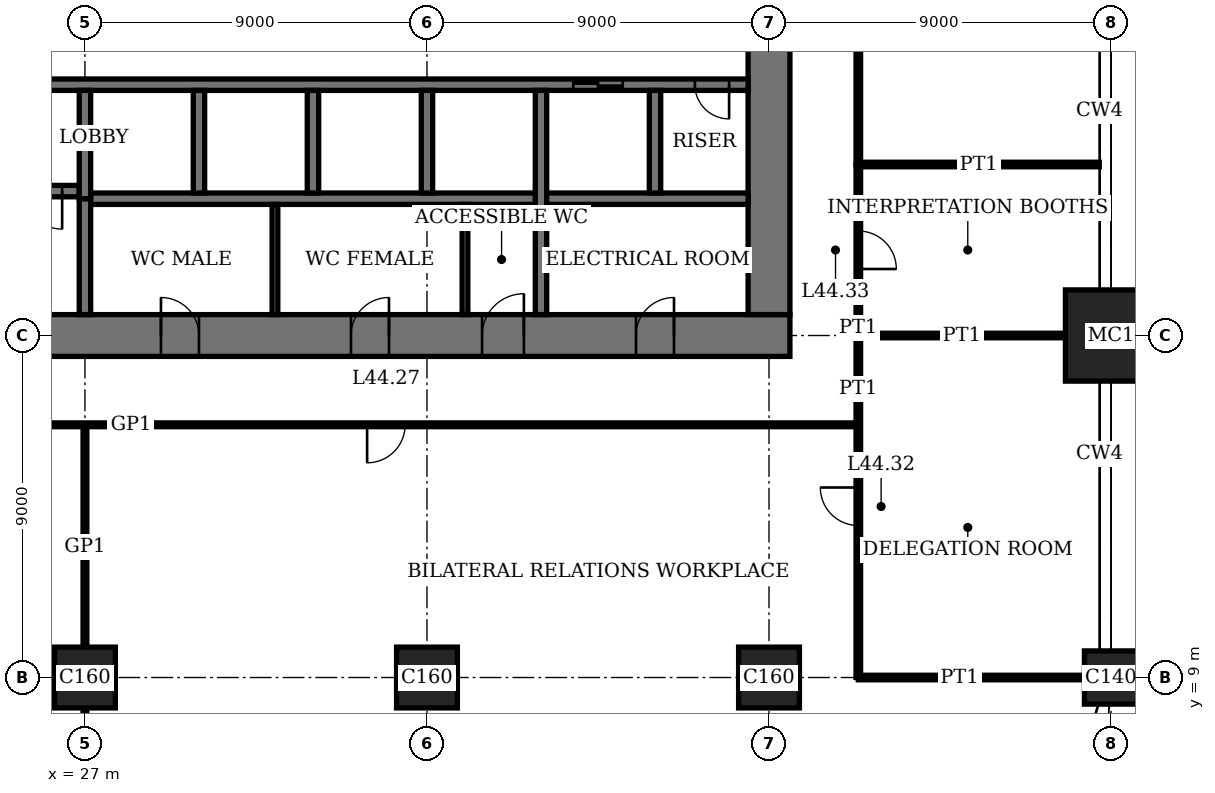
"""IFC4 building model, lengths in metres.
Left out: names, types, materials, properties, quantities, classifications, styles, units other than length and angle.
Written with IfcOpenShell. Run it as: python <this file> out.ifc"""

import sys

from ifc_helpers import new_model, si_unit, direction, frame, frame_2d, origin, origin_2d, place, context, subcontext, project, spatial, rectangle, extrude, element, fill, save


model = new_model("IFC4")
c1 = context("Model", 3, precision=1e-05, world=origin(), true_north=direction((0.0, 1.0)))
c2 = subcontext(c1, "Body", "Model", "MODEL_VIEW")
j1 = project(units=[si_unit("LENGTHUNIT", "METRE"), si_unit("PLANEANGLEUNIT", "RADIAN")], contexts=[c1])
p1 = place(None, origin())
s1 = spatial("IfcSite", under=j1, at=p1, CompositionType="ELEMENT")
p2 = place(p1, origin())
s2 = spatial("IfcBuilding", under=s1, at=p2, CompositionType="ELEMENT")
p3 = place(p2, frame((0.0, 0.0, 182.2)))
s3 = spatial("IfcBuildingStorey", under=s2, at=p3, CompositionType="ELEMENT", Elevation=182.2)
for number, where, z_axis, x_axis in (
    (1, (27.0, 9.0, 0.0), (0.0, 0.0, 1.0), (1.0, 0.0, 0.0)),
    (2, (36.0, 9.0, 0.0), (0.0, 0.0, 1.0), (1.0, 0.0, 0.0)),
    (3, (45.0, 9.0, 0.0), (0.0, 0.0, 1.0), (1.0, 0.0, 0.0)),
):
    element("IfcColumn", number, at=place(p3, frame(where, z_axis=z_axis, x_axis=x_axis)), inside=s3, PredefinedType="COLUMN", context=c2, shape_type="SweptSolid", body=[
        extrude(rectangle(XDim=1.6, YDim=1.6, at=origin_2d()), origin(), (0.0, 0.0, 1.0), 4.0),
    ])
p4 = place(p3, frame((54.0, 9.0, 0.0), z_axis=(0.0, 0.0, 1.0), x_axis=(1.0, 0.0, 0.0)))
e4 = element("IfcColumn", 4, at=p4, inside=s3, PredefinedType="COLUMN", context=c2, shape_type="SweptSolid", body=[
    extrude(rectangle(XDim=1.4, YDim=1.4, at=origin_2d()), origin(), (0.0, 0.0, 1.0), 4.0),
])
p5 = place(p3, frame((54.0, 18.0, 0.0), z_axis=(0.0, 0.0, 1.0), x_axis=(1.0, 0.0, 0.0)))
e5 = element("IfcColumn", 5, at=p5, inside=s3, PredefinedType="COLUMN", context=c2, shape_type="SweptSolid", body=[
    extrude(rectangle(XDim=2.4, YDim=2.4, at=origin_2d()), origin(), (0.0, 0.0, 1.0), 4.0),
])
p6 = place(p3, frame((17.45, 18.0, 0.0), z_axis=(0.0, 0.0, 1.0), x_axis=(1.0, 0.0, 0.0)))
e6 = element("IfcWall", 6, at=p6, inside=s3, PredefinedType="SHEAR", context=c2, shape_type="SweptSolid", body=[
    extrude(rectangle(XDim=28.1, YDim=1.1, at=frame_2d((14.05, 0.0))), origin(), (0.0, 0.0, 1.0), 4.0),
])
p7 = place(p6, frame((11.55, 0.0, 0.0)))
e7 = element("IfcOpeningElement", 7, at=p7, cuts=e6, PredefinedType="OPENING", context=c2, shape_type="SweptSolid", body=[
    extrude(rectangle(XDim=1.0, YDim=2.4, at=frame_2d((0.5, 1.2))), frame((0.0, 0.56, 0.0), z_axis=(0.0, -1.0, 0.0), x_axis=(1.0, 0.0, 0.0)), (0.0, 0.0, 1.0), 1.12),
])
p8 = place(p6, frame((16.55, 0.0, 0.0)))
e8 = element("IfcOpeningElement", 8, at=p8, cuts=e6, PredefinedType="OPENING", context=c2, shape_type="SweptSolid", body=[
    extrude(rectangle(XDim=1.0, YDim=2.4, at=frame_2d((0.5, 1.2))), frame((0.0, 0.56, 0.0), z_axis=(0.0, -1.0, 0.0), x_axis=(1.0, 0.0, 0.0)), (0.0, 0.0, 1.0), 1.12),
])
p9 = place(p6, frame((20.0, 0.0, 0.0)))
e9 = element("IfcOpeningElement", 9, at=p9, cuts=e6, PredefinedType="OPENING", context=c2, shape_type="SweptSolid", body=[
    extrude(rectangle(XDim=1.1, YDim=2.4, at=frame_2d((0.55, 1.2))), frame((0.0, 0.56, 0.0), z_axis=(0.0, -1.0, 0.0), x_axis=(1.0, 0.0, 0.0)), (0.0, 0.0, 1.0), 1.12),
])
p10 = place(p6, frame((24.05, 0.0, 0.0)))
e10 = element("IfcOpeningElement", 10, at=p10, cuts=e6, PredefinedType="OPENING", context=c2, shape_type="SweptSolid", body=[
    extrude(rectangle(XDim=1.0, YDim=2.4, at=frame_2d((0.5, 1.2))), frame((0.0, 0.56, 0.0), z_axis=(0.0, -1.0, 0.0), x_axis=(1.0, 0.0, 0.0)), (0.0, 0.0, 1.0), 1.12),
])
p11 = place(p3, frame((45.0, 18.55, 0.0), z_axis=(0.0, 0.0, 1.0), x_axis=(0.0, 1.0, 0.0)))
e11 = element("IfcWall", 11, at=p11, inside=s3, PredefinedType="SHEAR", context=c2, shape_type="SweptSolid", body=[
    extrude(rectangle(XDim=16.9, YDim=1.1, at=frame_2d((8.45, 0.0))), origin(), (0.0, 0.0, 1.0), 4.0),
])
p12 = place(p11, frame((8.45, 0.0, 0.0)))
e12 = element("IfcOpeningElement", 12, at=p12, cuts=e11, PredefinedType="OPENING", context=c2, shape_type="SweptSolid", body=[
    extrude(rectangle(XDim=1.8, YDim=2.4, at=frame_2d((0.9, 1.2))), frame((0.0, 0.56, 0.0), z_axis=(0.0, -1.0, 0.0), x_axis=(1.0, 0.0, 0.0)), (0.0, 0.0, 1.0), 1.12),
])
p13 = place(p3, frame((18.55, 21.8, 0.0), z_axis=(0.0, 0.0, 1.0), x_axis=(1.0, 0.0, 0.0)))
e13 = element("IfcWall", 13, at=p13, inside=s3, PredefinedType="SHEAR", context=c2, shape_type="SweptSolid", body=[
    extrude(rectangle(XDim=8.3, YDim=0.3, at=frame_2d((4.15, 0.0))), origin(), (0.0, 0.0, 1.0), 4.0),
])
p14 = place(p13, frame((6.85, 0.0, 0.0)))
e14 = element("IfcOpeningElement", 14, at=p14, cuts=e13, PredefinedType="OPENING", context=c2, shape_type="SweptSolid", body=[
    extrude(rectangle(XDim=1.0, YDim=2.4, at=frame_2d((0.5, 1.2))), frame((0.0, 0.16, 0.0), z_axis=(0.0, -1.0, 0.0), x_axis=(1.0, 0.0, 0.0)), (0.0, 0.0, 1.0), 0.32),
])
p15 = place(p3, frame((27.0, 18.55, 0.0), z_axis=(0.0, 0.0, 1.0), x_axis=(0.0, 1.0, 0.0)))
e15 = element("IfcWall", 15, at=p15, inside=s3, PredefinedType="SHEAR", context=c2, shape_type="SweptSolid", body=[
    extrude(rectangle(XDim=3.05, YDim=0.3, at=frame_2d((1.525, 0.0))), origin(), (0.0, 0.0, 1.0), 4.0),
])
p16 = place(p3, frame((18.55, 24.6, 0.0), z_axis=(0.0, 0.0, 1.0), x_axis=(1.0, 0.0, 0.0)))
e16 = element("IfcWall", 16, at=p16, inside=s3, PredefinedType="SHEAR", context=c2, shape_type="SweptSolid", body=[
    extrude(rectangle(XDim=25.9, YDim=0.3, at=frame_2d((12.95, 0.0))), origin(), (0.0, 0.0, 1.0), 4.0),
])
p17 = place(p16, frame((4.95, 0.0, 0.0)))
e17 = element("IfcOpeningElement", 17, at=p17, cuts=e16, PredefinedType="OPENING", context=c2, shape_type="SweptSolid", body=[
    extrude(rectangle(XDim=1.0, YDim=2.4, at=frame_2d((0.5, 1.2))), frame((0.0, 0.16, 0.0), z_axis=(0.0, -1.0, 0.0), x_axis=(1.0, 0.0, 0.0)), (0.0, 0.0, 1.0), 0.32),
])
p18 = place(p16, frame((24.5, 0.0, 0.0)))
e18 = element("IfcOpeningElement", 18, at=p18, cuts=e16, PredefinedType="OPENING", context=c2, shape_type="SweptSolid", body=[
    extrude(rectangle(XDim=0.9, YDim=2.1, at=frame_2d((0.45, 1.05))), frame((0.0, 0.16, 0.0), z_axis=(0.0, -1.0, 0.0), x_axis=(1.0, 0.0, 0.0)), (0.0, 0.0, 1.0), 0.32),
])
p19 = place(p16, frame((21.3, 0.0, 0.0)))
e19 = element("IfcOpeningElement", 19, at=p19, cuts=e16, PredefinedType="OPENING", context=c2, shape_type="SweptSolid", body=[
    extrude(rectangle(XDim=1.3, YDim=2.4, at=frame_2d((0.65, 1.2))), frame((0.0, 0.16, 0.0), z_axis=(0.0, -1.0, 0.0), x_axis=(1.0, 0.0, 0.0)), (0.0, 0.0, 1.0), 0.32),
])
p20 = place(p3, frame((27.15, 21.6, 0.0), z_axis=(0.0, 0.0, 1.0), x_axis=(1.0, 0.0, 0.0)))
e20 = element("IfcWall", 20, at=p20, inside=s3, PredefinedType="SHEAR", context=c2, shape_type="SweptSolid", body=[
    extrude(rectangle(XDim=17.3, YDim=0.3, at=frame_2d((8.65, 0.0))), origin(), (0.0, 0.0, 1.0), 4.0),
])
for number, where, z_axis, x_axis in (
    (21, (30.0, 21.75, 0.0), (0.0, 0.0, 1.0), (0.0, 1.0, 0.0)),
    (22, (33.0, 21.75, 0.0), (0.0, 0.0, 1.0), (0.0, 1.0, 0.0)),
    (23, (36.0, 21.75, 0.0), (0.0, 0.0, 1.0), (0.0, 1.0, 0.0)),
):
    element("IfcWall", number, at=place(p3, frame(where, z_axis=z_axis, x_axis=x_axis)), inside=s3, PredefinedType="SHEAR", context=c2, shape_type="SweptSolid", body=[
        extrude(rectangle(XDim=2.7, YDim=0.3, at=frame_2d((1.35, 0.0))), origin(), (0.0, 0.0, 1.0), 4.0),
    ])
p21 = place(p3, frame((39.0, 18.55, 0.0), z_axis=(0.0, 0.0, 1.0), x_axis=(0.0, 1.0, 0.0)))
e24 = element("IfcWall", 24, at=p21, inside=s3, PredefinedType="SHEAR", context=c2, shape_type="SweptSolid", body=[
    extrude(rectangle(XDim=5.9, YDim=0.3, at=frame_2d((2.95, 0.0))), origin(), (0.0, 0.0, 1.0), 4.0),
])
p22 = place(p3, frame((42.0, 21.75, 0.0), z_axis=(0.0, 0.0, 1.0), x_axis=(0.0, 1.0, 0.0)))
e25 = element("IfcWall", 25, at=p22, inside=s3, PredefinedType="SHEAR", context=c2, shape_type="SweptSolid", body=[
    extrude(rectangle(XDim=2.7, YDim=0.3, at=frame_2d((1.35, 0.0))), origin(), (0.0, 0.0, 1.0), 4.0),
])
p23 = place(p3, frame((27.0, 21.6, 0.0), z_axis=(0.0, 0.0, 1.0), x_axis=(0.0, 1.0, 0.0)))
e26 = element("IfcWall", 26, at=p23, inside=s3, PredefinedType="SHEAR", context=c2, shape_type="SweptSolid", body=[
    extrude(rectangle(XDim=2.85, YDim=0.3, at=frame_2d((1.425, 0.0))), origin(), (0.0, 0.0, 1.0), 4.0),
])
p24 = place(p3, frame((47.35, 9.0, 0.0), z_axis=(0.0, 0.0, 1.0), x_axis=(1.0, 0.0, 0.0)))
e27 = element("IfcWall", 27, at=p24, inside=s3, PredefinedType="PARTITIONING", context=c2, shape_type="SweptSolid", body=[
    extrude(rectangle(XDim=5.95, YDim=0.12, at=frame_2d((2.975, 0.0))), origin(), (0.0, 0.0, 1.0), 3.05),
])
p25 = place(p3, frame((22.5, 15.65, 0.0), z_axis=(0.0, 0.0, 1.0), x_axis=(1.0, 0.0, 0.0)))
e28 = element("IfcWall", 28, at=p25, inside=s3, PredefinedType="PARTITIONING", context=c2, shape_type="SweptSolid", body=[
    extrude(rectangle(XDim=24.85, YDim=0.1, at=frame_2d((12.425, 0.0))), origin(), (0.0, 0.0, 1.0), 3.75),
])
p26 = place(p25, frame((11.925, 0.0, 0.0)))
e29 = element("IfcOpeningElement", 29, at=p26, cuts=e28, PredefinedType="OPENING", context=c2, shape_type="SweptSolid", body=[
    extrude(rectangle(XDim=1.0, YDim=2.4, at=frame_2d((0.5, 1.2))), frame((0.0, 0.06, 0.0), z_axis=(0.0, -1.0, 0.0), x_axis=(1.0, 0.0, 0.0)), (0.0, 0.0, 1.0), 0.12),
])
p27 = place(p3, frame((47.35, 18.0, 0.0), z_axis=(0.0, 0.0, 1.0), x_axis=(1.0, 0.0, 0.0)))
e30 = element("IfcWall", 30, at=p27, inside=s3, PredefinedType="PARTITIONING", context=c2, shape_type="SweptSolid", body=[
    extrude(rectangle(XDim=5.45, YDim=0.12, at=frame_2d((2.725, 0.0))), origin(), (0.0, 0.0, 1.0), 3.05),
])
p28 = place(p3, frame((47.35, 22.5, 0.0), z_axis=(0.0, 0.0, 1.0), x_axis=(1.0, 0.0, 0.0)))
e31 = element("IfcWall", 31, at=p28, inside=s3, PredefinedType="PARTITIONING", context=c2, shape_type="SweptSolid", body=[
    extrude(rectangle(XDim=6.34, YDim=0.12, at=frame_2d((3.17, 0.0))), origin(), (0.0, 0.0, 1.0), 3.1),
])
p29 = place(p3, frame((27.0, 5.4, 0.0), z_axis=(0.0, 0.0, 1.0), x_axis=(0.0, 1.0, 0.0)))
e32 = element("IfcWall", 32, at=p29, inside=s3, PredefinedType="PARTITIONING", context=c2, shape_type="SweptSolid", body=[
    extrude(rectangle(XDim=2.8, YDim=0.1, at=frame_2d((1.4, 0.0))), origin(), (0.0, 0.0, 1.0), 3.05),
])
p30 = place(p3, frame((27.0, 9.8, 0.0), z_axis=(0.0, 0.0, 1.0), x_axis=(0.0, 1.0, 0.0)))
e33 = element("IfcWall", 33, at=p30, inside=s3, PredefinedType="PARTITIONING", context=c2, shape_type="SweptSolid", body=[
    extrude(rectangle(XDim=5.85, YDim=0.1, at=frame_2d((2.925, 0.0))), origin(), (0.0, 0.0, 1.0), 3.05),
])
p31 = place(p3, frame((47.35, 9.0, 0.0), z_axis=(0.0, 0.0, 1.0), x_axis=(0.0, 1.0, 0.0)))
e34 = element("IfcWall", 34, at=p31, inside=s3, PredefinedType="PARTITIONING", context=c2, shape_type="SweptSolid", body=[
    extrude(rectangle(XDim=9.0, YDim=0.12, at=frame_2d((4.5, 0.0))), origin(), (0.0, 0.0, 1.0), 3.75),
])
p32 = place(p31, frame((4.0, 0.0, 0.0)))
e35 = element("IfcOpeningElement", 35, at=p32, cuts=e34, PredefinedType="OPENING", context=c2, shape_type="SweptSolid", body=[
    extrude(rectangle(XDim=1.0, YDim=2.4, at=frame_2d((0.5, 1.2))), frame((0.0, 0.07, 0.0), z_axis=(0.0, -1.0, 0.0), x_axis=(1.0, 0.0, 0.0)), (0.0, 0.0, 1.0), 0.14),
])
p33 = place(p3, frame((47.35, 18.0, 0.0), z_axis=(0.0, 0.0, 1.0), x_axis=(0.0, 1.0, 0.0)))
e36 = element("IfcWall", 36, at=p33, inside=s3, PredefinedType="PARTITIONING", context=c2, shape_type="SweptSolid", body=[
    extrude(rectangle(XDim=4.5, YDim=0.12, at=frame_2d((2.25, 0.0))), origin(), (0.0, 0.0, 1.0), 3.75),
])
p34 = place(p33, frame((1.75, 0.0, 0.0)))
e37 = element("IfcOpeningElement", 37, at=p34, cuts=e36, PredefinedType="OPENING", context=c2, shape_type="SweptSolid", body=[
    extrude(rectangle(XDim=1.0, YDim=2.4, at=frame_2d((0.5, 1.2))), frame((0.0, 0.07, 0.0), z_axis=(0.0, -1.0, 0.0), x_axis=(1.0, 0.0, 0.0)), (0.0, 0.0, 1.0), 0.14),
])
p35 = place(p3, frame((47.35, 22.5, 0.0), z_axis=(0.0, 0.0, 1.0), x_axis=(0.0, 1.0, 0.0)))
e38 = element("IfcWall", 38, at=p35, inside=s3, PredefinedType="PARTITIONING", context=c2, shape_type="SweptSolid", body=[
    extrude(rectangle(XDim=9.0, YDim=0.12, at=frame_2d((4.5, 0.0))), origin(), (0.0, 0.0, 1.0), 3.75),
])
p36 = place(p35, frame((4.0, 0.0, 0.0)))
e39 = element("IfcOpeningElement", 39, at=p36, cuts=e38, PredefinedType="OPENING", context=c2, shape_type="SweptSolid", body=[
    extrude(rectangle(XDim=1.0, YDim=2.4, at=frame_2d((0.5, 1.2))), frame((0.0, 0.07, 0.0), z_axis=(0.0, -1.0, 0.0), x_axis=(1.0, 0.0, 0.0)), (0.0, 0.0, 1.0), 0.14),
])
for number, where, z_axis, x_axis in (
    (40, (32.0, 18.55, 0.0), (0.0, 0.0, 1.0), (0.0, 1.0, 0.0)),
    (41, (37.0, 18.55, 0.0), (0.0, 0.0, 1.0), (0.0, 1.0, 0.0)),
):
    element("IfcWall", number, at=place(p3, frame(where, z_axis=z_axis, x_axis=x_axis)), inside=s3, PredefinedType="PARTITIONING", context=c2, shape_type="SweptSolid", body=[
        extrude(rectangle(XDim=2.9, YDim=0.15, at=frame_2d((1.45, 0.0))), origin(), (0.0, 0.0, 1.0), 3.75),
    ])
p37 = place(p7, origin())
e42 = element("IfcDoor", 42, at=p37, inside=s3, OperationType="SINGLE_SWING_RIGHT", PredefinedType="DOOR", context=c2, shape_type="SweptSolid", body=[
    extrude(rectangle(XDim=1.0, YDim=2.4, at=frame_2d((0.5, 1.2))), frame((0.0, 0.025, 0.0), z_axis=(0.0, -1.0, 0.0), x_axis=(1.0, 0.0, 0.0)), (0.0, 0.0, 1.0), 0.05),
    extrude(rectangle(XDim=0.04, YDim=2.4, at=frame_2d((0.02, 1.2))), frame((0.0, 0.4, 0.0), z_axis=(0.0, -1.0, 0.0), x_axis=(1.0, 0.0, 0.0)), (0.0, 0.0, 1.0), 0.8),
    extrude(rectangle(XDim=0.04, YDim=2.4, at=frame_2d((0.98, 1.2))), frame((0.0, 0.4, 0.0), z_axis=(0.0, -1.0, 0.0), x_axis=(1.0, 0.0, 0.0)), (0.0, 0.0, 1.0), 0.8),
    extrude(rectangle(XDim=1.0, YDim=0.04, at=frame_2d((0.5, 2.38))), frame((0.0, 0.4, 0.0), z_axis=(0.0, -1.0, 0.0), x_axis=(1.0, 0.0, 0.0)), (0.0, 0.0, 1.0), 0.8),
])
fill(e7, e42)
p38 = place(p8, origin())
e43 = element("IfcDoor", 43, at=p38, inside=s3, OperationType="SINGLE_SWING_LEFT", PredefinedType="DOOR", context=c2, shape_type="SweptSolid", body=[
    extrude(rectangle(XDim=1.0, YDim=2.4, at=frame_2d((0.5, 1.2))), frame((0.0, 0.025, 0.0), z_axis=(0.0, -1.0, 0.0), x_axis=(1.0, 0.0, 0.0)), (0.0, 0.0, 1.0), 0.05),
    extrude(rectangle(XDim=0.04, YDim=2.4, at=frame_2d((0.02, 1.2))), frame((0.0, 0.4, 0.0), z_axis=(0.0, -1.0, 0.0), x_axis=(1.0, 0.0, 0.0)), (0.0, 0.0, 1.0), 0.8),
    extrude(rectangle(XDim=0.04, YDim=2.4, at=frame_2d((0.98, 1.2))), frame((0.0, 0.4, 0.0), z_axis=(0.0, -1.0, 0.0), x_axis=(1.0, 0.0, 0.0)), (0.0, 0.0, 1.0), 0.8),
    extrude(rectangle(XDim=1.0, YDim=0.04, at=frame_2d((0.5, 2.38))), frame((0.0, 0.4, 0.0), z_axis=(0.0, -1.0, 0.0), x_axis=(1.0, 0.0, 0.0)), (0.0, 0.0, 1.0), 0.8),
])
fill(e8, e43)
p39 = place(p9, origin())
e44 = element("IfcDoor", 44, at=p39, inside=s3, OperationType="SINGLE_SWING_LEFT", PredefinedType="DOOR", context=c2, shape_type="SweptSolid", body=[
    extrude(rectangle(XDim=1.1, YDim=2.4, at=frame_2d((0.55, 1.2))), frame((0.0, 0.025, 0.0), z_axis=(0.0, -1.0, 0.0), x_axis=(1.0, 0.0, 0.0)), (0.0, 0.0, 1.0), 0.05),
    extrude(rectangle(XDim=0.04, YDim=2.4, at=frame_2d((0.02, 1.2))), frame((0.0, 0.44, 0.0), z_axis=(0.0, -1.0, 0.0), x_axis=(1.0, 0.0, 0.0)), (0.0, 0.0, 1.0), 0.88),
    extrude(rectangle(XDim=0.04, YDim=2.4, at=frame_2d((1.08, 1.2))), frame((0.0, 0.44, 0.0), z_axis=(0.0, -1.0, 0.0), x_axis=(1.0, 0.0, 0.0)), (0.0, 0.0, 1.0), 0.88),
    extrude(rectangle(XDim=1.1, YDim=0.04, at=frame_2d((0.55, 2.38))), frame((0.0, 0.44, 0.0), z_axis=(0.0, -1.0, 0.0), x_axis=(1.0, 0.0, 0.0)), (0.0, 0.0, 1.0), 0.88),
])
fill(e9, e44)
p40 = place(p10, origin())
e45 = element("IfcDoor", 45, at=p40, inside=s3, OperationType="SINGLE_SWING_LEFT", PredefinedType="DOOR", context=c2, shape_type="SweptSolid", body=[
    extrude(rectangle(XDim=1.0, YDim=2.4, at=frame_2d((0.5, 1.2))), frame((0.0, 0.025, 0.0), z_axis=(0.0, -1.0, 0.0), x_axis=(1.0, 0.0, 0.0)), (0.0, 0.0, 1.0), 0.05),
    extrude(rectangle(XDim=0.04, YDim=2.4, at=frame_2d((0.02, 1.2))), frame((0.0, 0.4, 0.0), z_axis=(0.0, -1.0, 0.0), x_axis=(1.0, 0.0, 0.0)), (0.0, 0.0, 1.0), 0.8),
    extrude(rectangle(XDim=0.04, YDim=2.4, at=frame_2d((0.98, 1.2))), frame((0.0, 0.4, 0.0), z_axis=(0.0, -1.0, 0.0), x_axis=(1.0, 0.0, 0.0)), (0.0, 0.0, 1.0), 0.8),
    extrude(rectangle(XDim=1.0, YDim=0.04, at=frame_2d((0.5, 2.38))), frame((0.0, 0.4, 0.0), z_axis=(0.0, -1.0, 0.0), x_axis=(1.0, 0.0, 0.0)), (0.0, 0.0, 1.0), 0.8),
])
fill(e10, e45)
p41 = place(p14, origin())
e46 = element("IfcDoor", 46, at=p41, inside=s3, OperationType="SINGLE_SWING_RIGHT", PredefinedType="DOOR", context=c2, shape_type="SweptSolid", body=[
    extrude(rectangle(XDim=1.0, YDim=2.4, at=frame_2d((0.5, 1.2))), frame((0.0, 0.03, 0.0), z_axis=(0.0, -1.0, 0.0), x_axis=(1.0, 0.0, 0.0)), (0.0, 0.0, 1.0), 0.06),
])
fill(e14, e46)
p42 = place(p18, origin())
e47 = element("IfcDoor", 47, at=p42, inside=s3, OperationType="SINGLE_SWING_RIGHT", PredefinedType="DOOR", context=c2, shape_type="SweptSolid", body=[
    extrude(rectangle(XDim=0.9, YDim=2.1, at=frame_2d((0.45, 1.05))), frame((0.0, 0.03, 0.0), z_axis=(0.0, -1.0, 0.0), x_axis=(1.0, 0.0, 0.0)), (0.0, 0.0, 1.0), 0.06),
])
fill(e18, e47)
p43 = place(p26, origin())
e48 = element("IfcDoor", 48, at=p43, inside=s3, OperationType="SINGLE_SWING_LEFT", PredefinedType="DOOR", context=c2, shape_type="SweptSolid", body=[
    extrude(rectangle(XDim=1.0, YDim=2.4, at=frame_2d((0.5, 1.2))), frame((0.0, 0.02, 0.0), z_axis=(0.0, -1.0, 0.0), x_axis=(1.0, 0.0, 0.0)), (0.0, 0.0, 1.0), 0.04),
])
fill(e29, e48)
p44 = place(p32, origin())
e49 = element("IfcDoor", 49, at=p44, inside=s3, OperationType="SINGLE_SWING_LEFT", PredefinedType="DOOR", context=c2, shape_type="SweptSolid", body=[
    extrude(rectangle(XDim=1.0, YDim=2.4, at=frame_2d((0.5, 1.2))), frame((0.0, 0.025, 0.0), z_axis=(0.0, -1.0, 0.0), x_axis=(1.0, 0.0, 0.0)), (0.0, 0.0, 1.0), 0.05),
])
fill(e35, e49)
p45 = place(p34, origin())
e50 = element("IfcDoor", 50, at=p45, inside=s3, OperationType="SINGLE_SWING_LEFT", PredefinedType="DOOR", context=c2, shape_type="SweptSolid", body=[
    extrude(rectangle(XDim=1.0, YDim=2.4, at=frame_2d((0.5, 1.2))), frame((0.0, 0.025, 0.0), z_axis=(0.0, -1.0, 0.0), x_axis=(1.0, 0.0, 0.0)), (0.0, 0.0, 1.0), 0.05),
])
fill(e37, e50)
p46 = place(p19, origin())
e51 = element("IfcDoor", 51, at=p46, inside=s3, OperationType="DOUBLE_DOOR_SLIDING", PredefinedType="DOOR", context=c2, shape_type="SweptSolid", body=[
    extrude(rectangle(XDim=1.3, YDim=2.4, at=frame_2d((0.65, 1.2))), frame((0.0, 0.02, 0.0), z_axis=(0.0, -1.0, 0.0), x_axis=(1.0, 0.0, 0.0)), (0.0, 0.0, 1.0), 0.04),
])
fill(e19, e51)
save(model, sys.argv[1])
